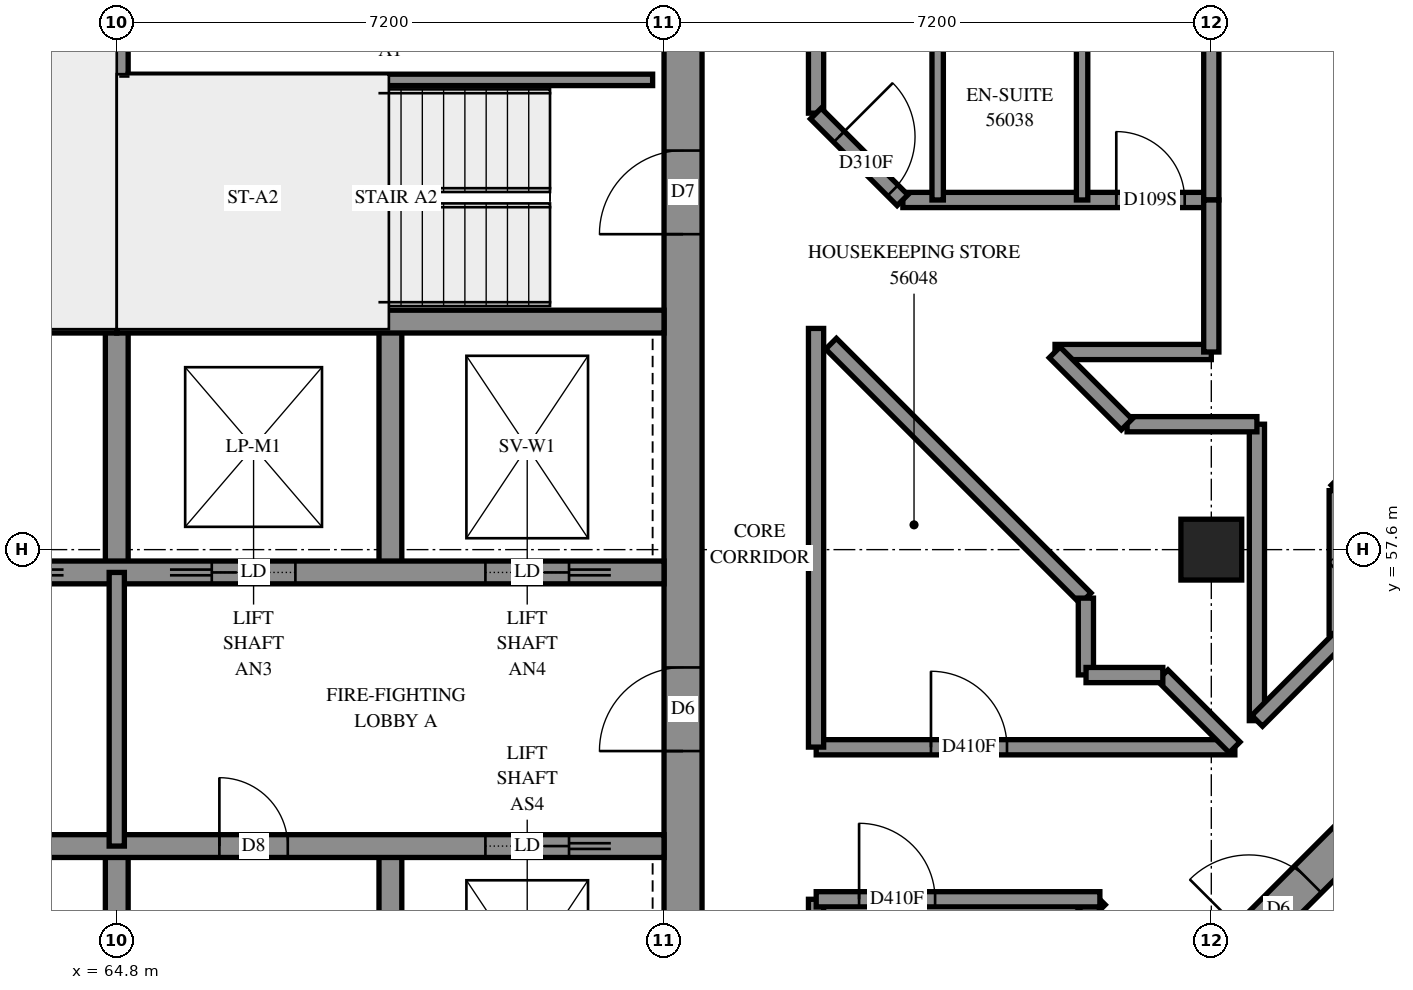
"""IFC4 building model, lengths in metres.
Left out: names, types, materials, properties, quantities, classifications, styles, units other than length and angle.
Written with IfcOpenShell. Run it as: python <this file> out.ifc"""

import sys

from ifc_helpers import new_model, si_unit, direction, frame, frame_2d, origin, origin_2d, place, context, subcontext, project, spatial, rectangle, extrude, element, fill, save


model = new_model("IFC4")
c1 = context("Model", 3, precision=1e-05, world=origin(), true_north=direction((0.0, 1.0)))
c2 = subcontext(c1, "Body", "Model", "MODEL_VIEW")
j1 = project(units=[si_unit("LENGTHUNIT", "METRE"), si_unit("PLANEANGLEUNIT", "RADIAN")], contexts=[c1])
p1 = place(None, origin())
s1 = spatial("IfcSite", under=j1, at=p1, CompositionType="ELEMENT")
p2 = place(p1, origin())
s2 = spatial("IfcBuilding", under=s1, at=p2, CompositionType="ELEMENT")
p3 = place(p2, frame((0.0, 0.0, 206.6)))
s3 = spatial("IfcBuildingStorey", under=s2, at=p3, CompositionType="ELEMENT", Elevation=206.6)
p4 = place(p3, frame((79.2, 57.6, 0.0), z_axis=(0.0, 0.0, 1.0), x_axis=(1.0, 0.0, 0.0)))
e1 = element("IfcColumn", 1, at=p4, inside=s3, PredefinedType="COLUMN", context=c2, shape_type="SweptSolid", body=[
    extrude(rectangle(XDim=0.8, YDim=0.8, at=origin_2d()), origin(), (0.0, 0.0, 1.0), 3.1),
])
p5 = place(p3, frame((72.25, 50.4, -0.3), z_axis=(0.0, 0.0, 1.0), x_axis=(0.0, 1.0, 0.0)))
e2 = element("IfcWall", 2, at=p5, inside=s3, PredefinedType="SHEAR", context=c2, shape_type="SweptSolid", body=[
    extrude(rectangle(XDim=14.4, YDim=0.5, at=frame_2d((7.2, 0.0))), origin(), (0.0, 0.0, 1.0), 2.7),
])
p6 = place(p5, frame((4.55, 0.0, 0.3)))
e3 = element("IfcOpeningElement", 3, at=p6, cuts=e2, PredefinedType="OPENING", context=c2, shape_type="SweptSolid", body=[
    extrude(rectangle(XDim=1.1, YDim=2.1, at=frame_2d((0.55, 1.05))), frame((0.0, 0.26, 0.0), z_axis=(0.0, -1.0, 0.0), x_axis=(1.0, 0.0, 0.0)), (0.0, 0.0, 1.0), 0.52),
])
p7 = place(p5, frame((11.35, 0.0, 0.3)))
e4 = element("IfcOpeningElement", 4, at=p7, cuts=e2, PredefinedType="OPENING", context=c2, shape_type="SweptSolid", body=[
    extrude(rectangle(XDim=1.1, YDim=2.1, at=frame_2d((0.55, 1.05))), frame((0.0, 0.26, 0.0), z_axis=(0.0, -1.0, 0.0), x_axis=(1.0, 0.0, 0.0)), (0.0, 0.0, 1.0), 0.52),
])
for number, where, z_axis, x_axis in (
    (5, (64.8, 50.4, 0.0), (0.0, 0.0, 1.0), (0.0, 1.0, 0.0)),
    (6, (64.8, 57.3, 0.0), (0.0, 0.0, 1.0), (0.0, 1.0, 0.0)),
    (7, (68.4, 50.4, 0.0), (0.0, 0.0, 1.0), (0.0, 1.0, 0.0)),
    (8, (68.4, 57.3, 0.0), (0.0, 0.0, 1.0), (0.0, 1.0, 0.0)),
):
    element("IfcWall", number, at=place(p3, frame(where, z_axis=z_axis, x_axis=x_axis)), inside=s3, PredefinedType="SOLIDWALL", context=c2, shape_type="SweptSolid", body=[
        extrude(rectangle(XDim=3.3, YDim=0.3, at=frame_2d((1.65, 0.0))), origin(), (0.0, 0.0, 1.0), 3.1),
    ])
p8 = place(p3, frame((57.6, 53.7, 0.0), z_axis=(0.0, 0.0, 1.0), x_axis=(1.0, 0.0, 0.0)))
e9 = element("IfcWall", 9, at=p8, inside=s3, PredefinedType="SOLIDWALL", context=c2, shape_type="SweptSolid", body=[
    extrude(rectangle(XDim=14.4, YDim=0.3, at=frame_2d((7.2, 0.0))), origin(), (0.0, 0.0, 1.0), 3.1),
])
p9 = place(p8, frame((1.35, 0.0, 0.0)))
e10 = element("IfcOpeningElement", 10, at=p9, cuts=e9, PredefinedType="OPENING", context=c2, shape_type="SweptSolid", body=[
    extrude(rectangle(XDim=0.9, YDim=2.1, at=frame_2d((0.45, 1.05))), frame((0.0, 0.16, 0.0), z_axis=(0.0, -1.0, 0.0), x_axis=(1.0, 0.0, 0.0)), (0.0, 0.0, 1.0), 0.32),
])
p10 = place(p8, frame((4.95, 0.0, 0.0)))
e11 = element("IfcOpeningElement", 11, at=p10, cuts=e9, PredefinedType="OPENING", context=c2, shape_type="SweptSolid", body=[
    extrude(rectangle(XDim=0.9, YDim=2.1, at=frame_2d((0.45, 1.05))), frame((0.0, 0.16, 0.0), z_axis=(0.0, -1.0, 0.0), x_axis=(1.0, 0.0, 0.0)), (0.0, 0.0, 1.0), 0.32),
])
p11 = place(p8, frame((8.55, 0.0, 0.0)))
e12 = element("IfcOpeningElement", 12, at=p11, cuts=e9, PredefinedType="OPENING", context=c2, shape_type="SweptSolid", body=[
    extrude(rectangle(XDim=0.9, YDim=2.1, at=frame_2d((0.45, 1.05))), frame((0.0, 0.16, 0.0), z_axis=(0.0, -1.0, 0.0), x_axis=(1.0, 0.0, 0.0)), (0.0, 0.0, 1.0), 0.32),
])
p12 = place(p8, frame((12.05, 0.0, 0.0)))
e13 = element("IfcOpeningElement", 13, at=p12, cuts=e9, PredefinedType="OPENING", context=c2, shape_type="SweptSolid", body=[
    extrude(rectangle(XDim=1.1, YDim=2.1, at=frame_2d((0.55, 1.05))), frame((0.0, 0.16, 0.0), z_axis=(0.0, -1.0, 0.0), x_axis=(1.0, 0.0, 0.0)), (0.0, 0.0, 1.0), 0.32),
])
p13 = place(p3, frame((57.6, 57.3, 0.0), z_axis=(0.0, 0.0, 1.0), x_axis=(1.0, 0.0, 0.0)))
e14 = element("IfcWall", 14, at=p13, inside=s3, PredefinedType="SOLIDWALL", context=c2, shape_type="SweptSolid", body=[
    extrude(rectangle(XDim=14.4, YDim=0.3, at=frame_2d((7.2, 0.0))), origin(), (0.0, 0.0, 1.0), 3.1),
])
p14 = place(p13, frame((1.25, 0.0, 0.0)))
e15 = element("IfcOpeningElement", 15, at=p14, cuts=e14, PredefinedType="OPENING", context=c2, shape_type="SweptSolid", body=[
    extrude(rectangle(XDim=1.1, YDim=2.1, at=frame_2d((0.55, 1.05))), frame((0.0, 0.16, 0.0), z_axis=(0.0, -1.0, 0.0), x_axis=(1.0, 0.0, 0.0)), (0.0, 0.0, 1.0), 0.32),
])
p15 = place(p13, frame((4.85, 0.0, 0.0)))
e16 = element("IfcOpeningElement", 16, at=p15, cuts=e14, PredefinedType="OPENING", context=c2, shape_type="SweptSolid", body=[
    extrude(rectangle(XDim=1.1, YDim=2.1, at=frame_2d((0.55, 1.05))), frame((0.0, 0.16, 0.0), z_axis=(0.0, -1.0, 0.0), x_axis=(1.0, 0.0, 0.0)), (0.0, 0.0, 1.0), 0.32),
])
p16 = place(p13, frame((8.45, 0.0, 0.0)))
e17 = element("IfcOpeningElement", 17, at=p16, cuts=e14, PredefinedType="OPENING", context=c2, shape_type="SweptSolid", body=[
    extrude(rectangle(XDim=1.1, YDim=2.1, at=frame_2d((0.55, 1.05))), frame((0.0, 0.16, 0.0), z_axis=(0.0, -1.0, 0.0), x_axis=(1.0, 0.0, 0.0)), (0.0, 0.0, 1.0), 0.32),
])
p17 = place(p13, frame((12.05, 0.0, 0.0)))
e18 = element("IfcOpeningElement", 18, at=p17, cuts=e14, PredefinedType="OPENING", context=c2, shape_type="SweptSolid", body=[
    extrude(rectangle(XDim=1.1, YDim=2.1, at=frame_2d((0.55, 1.05))), frame((0.0, 0.16, 0.0), z_axis=(0.0, -1.0, 0.0), x_axis=(1.0, 0.0, 0.0)), (0.0, 0.0, 1.0), 0.32),
])
for number, where, z_axis, x_axis in (
    (19, (57.6, 60.6, 0.0), (0.0, 0.0, 1.0), (1.0, 0.0, 0.0)),
    (20, (64.8, 60.6, 0.0), (0.0, 0.0, 1.0), (1.0, 0.0, 0.0)),
):
    element("IfcWall", number, at=place(p3, frame(where, z_axis=z_axis, x_axis=x_axis)), inside=s3, PredefinedType="SOLIDWALL", context=c2, shape_type="SweptSolid", body=[
        extrude(rectangle(XDim=7.2, YDim=0.3, at=frame_2d((3.6, 0.0))), origin(), (0.0, 0.0, 1.0), 3.1),
    ])
p18 = place(p3, frame((64.8, 60.6, 0.0), z_axis=(0.0, 0.0, 1.0), x_axis=(0.0, 1.0, 0.0)))
e21 = element("IfcWall", 21, at=p18, inside=s3, PredefinedType="SOLIDWALL", context=c2, shape_type="SweptSolid", body=[
    extrude(rectangle(XDim=4.2, YDim=0.3, at=frame_2d((2.1, 0.0))), origin(), (0.0, 0.0, 1.0), 3.1),
])
p19 = place(p3, frame((76.478, 49.267, -0.3), z_axis=(0.0, 0.0, 1.0), x_axis=(0.7071067812, 0.7071067812, 0.0)))
e22 = element("IfcWall", 22, at=p19, inside=s3, PredefinedType="SHEAR", context=c2, shape_type="SweptSolid", body=[
    extrude(rectangle(XDim=14.4, YDim=0.5, at=frame_2d((7.2, 0.0))), origin(), (0.0, 0.0, 1.0), 2.7),
])
p20 = place(p19, frame((4.55, 0.0, 0.3)))
e23 = element("IfcOpeningElement", 23, at=p20, cuts=e22, PredefinedType="OPENING", context=c2, shape_type="SweptSolid", body=[
    extrude(rectangle(XDim=1.1, YDim=2.1, at=frame_2d((0.55, 1.05))), frame((0.0, 0.26, 0.0), z_axis=(0.0, -1.0, 0.0), x_axis=(1.0, 0.0, 0.0)), (0.0, 0.0, 1.0), 0.52),
])
p21 = place(p19, frame((11.35, 0.0, 0.3)))
e24 = element("IfcOpeningElement", 24, at=p21, cuts=e22, PredefinedType="OPENING", context=c2, shape_type="SweptSolid", body=[
    extrude(rectangle(XDim=1.1, YDim=2.1, at=frame_2d((0.55, 1.05))), frame((0.0, 0.26, 0.0), z_axis=(0.0, -1.0, 0.0), x_axis=(1.0, 0.0, 0.0)), (0.0, 0.0, 1.0), 0.52),
])
p22 = place(p3, frame((64.95, 63.78, 0.0), z_axis=(0.0, 0.0, 1.0), x_axis=(1.0, 0.0, 0.0)))
e25 = element("IfcWall", 25, at=p22, inside=s3, PredefinedType="PARTITIONING", context=c2, shape_type="SweptSolid", body=[
    extrude(rectangle(XDim=6.9, YDim=0.15, at=frame_2d((3.45, 0.0))), origin(), (0.0, 0.0, 1.0), 3.1),
])
p23 = place(p3, frame((64.8, 53.7, 0.0), z_axis=(0.0, 0.0, 1.0), x_axis=(0.0, 1.0, 0.0)))
e26 = element("IfcWall", 26, at=p23, inside=s3, PredefinedType="PARTITIONING", context=c2, shape_type="SweptSolid", body=[
    extrude(rectangle(XDim=3.6, YDim=0.2, at=frame_2d((1.8, 0.0))), origin(), (0.0, 0.0, 1.0), 3.1),
])
p24 = place(p3, frame((80.849, 58.377, 0.0), z_axis=(0.0, 0.0, 1.0), x_axis=(0.7071121022, 0.7071014601, 0.0)))
e27 = element("IfcWall", 27, at=p24, inside=s3, PredefinedType="PARTITIONING", context=c2, shape_type="SweptSolid", body=[
    extrude(rectangle(XDim=9.397, YDim=0.2, at=frame_2d((4.698, 0.0))), origin(), (0.0, 0.0, 1.0), 3.1),
])
p25 = place(p3, frame((74.002, 55.0, 0.0), z_axis=(0.0, 0.0, 1.0), x_axis=(1.0, 0.0, 0.0)))
e28 = element("IfcWall", 28, at=p25, inside=s3, PredefinedType="PARTITIONING", context=c2, shape_type="SweptSolid", body=[
    extrude(rectangle(XDim=5.508, YDim=0.2, at=frame_2d((2.754, 0.0))), origin(), (0.0, 0.0, 1.0), 3.1),
])
p26 = place(p25, frame((1.51, 0.0, 0.0)))
e29 = element("IfcOpeningElement", 29, at=p26, cuts=e28, PredefinedType="OPENING", context=c2, shape_type="SweptSolid", body=[
    extrude(rectangle(XDim=1.0, YDim=2.1, at=frame_2d((0.5, 1.05))), frame((0.0, 0.11, 0.0), z_axis=(0.0, -1.0, 0.0), x_axis=(1.0, 0.0, 0.0)), (0.0, 0.0, 1.0), 0.22),
])
p27 = place(p3, frame((74.0, 55.002, 0.0), z_axis=(0.0, 0.0, 1.0), x_axis=(0.0, 1.0, 0.0)))
e30 = element("IfcWall", 30, at=p27, inside=s3, PredefinedType="PARTITIONING", context=c2, shape_type="SweptSolid", body=[
    extrude(rectangle(XDim=5.508, YDim=0.2, at=frame_2d((2.754, 0.0))), origin(), (0.0, 0.0, 1.0), 3.1),
])
p28 = place(p3, frame((74.001, 49.267, 0.0), z_axis=(0.0, 0.0, 1.0), x_axis=(0.7071067812, 0.7071067812, 0.0)))
e31 = element("IfcWall", 31, at=p28, inside=s3, PredefinedType="PARTITIONING", context=c2, shape_type="SweptSolid", body=[
    extrude(rectangle(XDim=5.278, YDim=0.2, at=frame_2d((2.639, 0.0))), origin(), (0.0, 0.0, 1.0), 3.1),
])
p29 = place(p3, frame((74.197, 60.309, 0.0), z_axis=(0.0, 0.0, 1.0), x_axis=(0.7071067812, -0.7071067812, 0.0)))
e32 = element("IfcWall", 32, at=p29, inside=s3, PredefinedType="PARTITIONING", context=c2, shape_type="SweptSolid", body=[
    extrude(rectangle(XDim=4.738, YDim=0.2, at=frame_2d((2.369, 0.0))), origin(), (0.0, 0.0, 1.0), 3.1),
])
p30 = place(p3, frame((75.142, 62.2, 0.0), z_axis=(0.0, 0.0, 1.0), x_axis=(1.0, 0.0, 0.0)))
e33 = element("IfcWall", 33, at=p30, inside=s3, PredefinedType="PARTITIONING", context=c2, shape_type="SweptSolid", body=[
    extrude(rectangle(XDim=4.058, YDim=0.2, at=frame_2d((2.029, 0.0))), origin(), (0.0, 0.0, 1.0), 3.1),
])
p31 = place(p30, frame((2.808, 0.0, 0.0)))
e34 = element("IfcOpeningElement", 34, at=p31, cuts=e33, PredefinedType="OPENING", context=c2, shape_type="SweptSolid", body=[
    extrude(rectangle(XDim=0.9, YDim=2.1, at=frame_2d((0.45, 1.05))), frame((0.0, 0.11, 0.0), z_axis=(0.0, -1.0, 0.0), x_axis=(1.0, 0.0, 0.0)), (0.0, 0.0, 1.0), 0.22),
])
p32 = place(p3, frame((79.8, 55.35, 0.0), z_axis=(0.0, 0.0, 1.0), x_axis=(0.0, 1.0, 0.0)))
e35 = element("IfcWall", 35, at=p32, inside=s3, PredefinedType="PARTITIONING", context=c2, shape_type="SweptSolid", body=[
    extrude(rectangle(XDim=3.9, YDim=0.2, at=frame_2d((1.95, 0.0))), origin(), (0.0, 0.0, 1.0), 3.1),
])
p33 = place(p3, frame((74.0, 49.266, 0.0), z_axis=(0.0, 0.0, 1.0), x_axis=(0.0, 1.0, 0.0)))
e36 = element("IfcWall", 36, at=p33, inside=s3, PredefinedType="PARTITIONING", context=c2, shape_type="SweptSolid", body=[
    extrude(rectangle(XDim=3.734, YDim=0.2, at=frame_2d((1.867, 0.0))), origin(), (0.0, 0.0, 1.0), 3.1),
])
p34 = place(p3, frame((74.002, 53.0, 0.0), z_axis=(0.0, 0.0, 1.0), x_axis=(1.0, 0.0, 0.0)))
e37 = element("IfcWall", 37, at=p34, inside=s3, PredefinedType="PARTITIONING", context=c2, shape_type="SweptSolid", body=[
    extrude(rectangle(XDim=3.732, YDim=0.2, at=frame_2d((1.866, 0.0))), origin(), (0.0, 0.0, 1.0), 3.1),
])
p35 = place(p34, frame((0.564, 0.0, 0.0)))
e38 = element("IfcOpeningElement", 38, at=p35, cuts=e37, PredefinedType="OPENING", context=c2, shape_type="SweptSolid", body=[
    extrude(rectangle(XDim=1.0, YDim=2.1, at=frame_2d((0.5, 1.05))), frame((0.0, 0.11, 0.0), z_axis=(0.0, -1.0, 0.0), x_axis=(1.0, 0.0, 0.0)), (0.0, 0.0, 1.0), 0.22),
])
p36 = place(p3, frame((74.0, 63.342, 0.0), z_axis=(0.0, 0.0, 1.0), x_axis=(0.0, 1.0, 0.0)))
e39 = element("IfcWall", 39, at=p36, inside=s3, PredefinedType="PARTITIONING", context=c2, shape_type="SweptSolid", body=[
    extrude(rectangle(XDim=3.458, YDim=0.2, at=frame_2d((1.729, 0.0))), origin(), (0.0, 0.0, 1.0), 3.1),
])
for number, where, z_axis, x_axis in (
    (40, (75.6, 62.2, 0.0), (0.0, 0.0, 1.0), (0.0, 1.0, 0.0)),
    (41, (77.5, 62.2, 0.0), (0.0, 0.0, 1.0), (0.0, 1.0, 0.0)),
):
    element("IfcWall", number, at=place(p3, frame(where, z_axis=z_axis, x_axis=x_axis)), inside=s3, PredefinedType="PARTITIONING", context=c2, shape_type="SweptSolid", body=[
        extrude(rectangle(XDim=2.4, YDim=0.15, at=frame_2d((1.2, 0.0))), origin(), (0.0, 0.0, 1.0), 3.1),
    ])
p37 = place(p3, frame((79.2, 62.2, 0.0), z_axis=(0.0, 0.0, 1.0), x_axis=(0.0, 1.0, 0.0)))
e42 = element("IfcWall", 42, at=p37, inside=s3, PredefinedType="PARTITIONING", context=c2, shape_type="SweptSolid", body=[
    extrude(rectangle(XDim=2.2, YDim=0.2, at=frame_2d((1.1, 0.0))), origin(), (0.0, 0.0, 1.0), 3.1),
])
p38 = place(p3, frame((77.144, 60.2, 0.0), z_axis=(0.0, 0.0, 1.0), x_axis=(1.0, 0.0, 0.0)))
e43 = element("IfcWall", 43, at=p38, inside=s3, PredefinedType="PARTITIONING", context=c2, shape_type="SweptSolid", body=[
    extrude(rectangle(XDim=2.056, YDim=0.2, at=frame_2d((1.028, 0.0))), origin(), (0.0, 0.0, 1.0), 3.1),
])
p39 = place(p3, frame((79.2, 60.2, 0.0), z_axis=(0.0, 0.0, 1.0), x_axis=(0.0, 1.0, 0.0)))
e44 = element("IfcWall", 44, at=p39, inside=s3, PredefinedType="PARTITIONING", context=c2, shape_type="SweptSolid", body=[
    extrude(rectangle(XDim=2.0, YDim=0.2, at=frame_2d((1.0, 0.0))), origin(), (0.0, 0.0, 1.0), 3.1),
])
p40 = place(p3, frame((80.85, 56.49, 0.0), z_axis=(0.0, 0.0, 1.0), x_axis=(0.0, 1.0, 0.0)))
e45 = element("IfcWall", 45, at=p40, inside=s3, PredefinedType="PARTITIONING", context=c2, shape_type="SweptSolid", body=[
    extrude(rectangle(XDim=1.886, YDim=0.2, at=frame_2d((0.943, 0.0))), origin(), (0.0, 0.0, 1.0), 3.1),
])
p41 = place(p3, frame((78.092, 59.25, 0.0), z_axis=(0.0, 0.0, 1.0), x_axis=(1.0, 0.0, 0.0)))
e46 = element("IfcWall", 46, at=p41, inside=s3, PredefinedType="PARTITIONING", context=c2, shape_type="SweptSolid", body=[
    extrude(rectangle(XDim=1.708, YDim=0.2, at=frame_2d((0.854, 0.0))), origin(), (0.0, 0.0, 1.0), 3.1),
])
p42 = place(p3, frame((73.997, 63.337, 0.0), z_axis=(0.0, 0.0, 1.0), x_axis=(0.7071067812, -0.7071067812, 0.0)))
e47 = element("IfcWall", 47, at=p42, inside=s3, PredefinedType="PARTITIONING", context=c2, shape_type="SweptSolid", body=[
    extrude(rectangle(XDim=1.612, YDim=0.2, at=frame_2d((0.806, 0.0))), origin(), (0.0, 0.0, 1.0), 3.1),
])
p43 = place(p42, frame((0.432, 0.0, 0.0)))
e48 = element("IfcOpeningElement", 48, at=p43, cuts=e47, PredefinedType="OPENING", context=c2, shape_type="SweptSolid", body=[
    extrude(rectangle(XDim=1.0, YDim=2.1, at=frame_2d((0.5, 1.05))), frame((0.0, 0.11, 0.0), z_axis=(0.0, -1.0, 0.0), x_axis=(1.0, 0.0, 0.0)), (0.0, 0.0, 1.0), 0.22),
])
p44 = place(p3, frame((79.803, 55.347, 0.0), z_axis=(0.0, 0.0, 1.0), x_axis=(0.706460727, 0.7077522457, 0.0)))
e49 = element("IfcWall", 49, at=p44, inside=s3, PredefinedType="PARTITIONING", context=c2, shape_type="SweptSolid", body=[
    extrude(rectangle(XDim=1.549, YDim=0.2, at=frame_2d((0.774, 0.0))), origin(), (0.0, 0.0, 1.0), 3.1),
])
for number, where, z_axis, x_axis in (
    (50, (78.559, 55.947, 0.0), (0.0, 0.0, 1.0), (0.707, -0.707, 0.0)),
    (51, (77.139, 60.195, 0.0), (0.0, 0.0, 1.0), (0.707, -0.707, 0.0)),
):
    element("IfcWall", number, at=place(p3, frame(where, z_axis=z_axis, x_axis=x_axis)), inside=s3, PredefinedType="PARTITIONING", context=c2, shape_type="SweptSolid", body=[
        extrude(rectangle(XDim=1.341, YDim=0.2, at=frame_2d((0.67, 0.0))), origin(), (0.0, 0.0, 1.0), 3.1),
    ])
for number, where, z_axis, x_axis in (
    (52, (77.55, 55.952, 0.0), (0.0, 0.0, 1.0), (0.0, 1.0, 0.0)),
    (53, (77.552, 55.95, 0.0), (0.0, 0.0, 1.0), (1.0, 0.0, 0.0)),
):
    element("IfcWall", number, at=place(p3, frame(where, z_axis=z_axis, x_axis=x_axis)), inside=s3, PredefinedType="PARTITIONING", context=c2, shape_type="SweptSolid", body=[
        extrude(rectangle(XDim=1.01, YDim=0.2, at=frame_2d((0.505, 0.0))), origin(), (0.0, 0.0, 1.0), 3.1),
    ])
p45 = place(p6, origin())
e54 = element("IfcDoor", 54, at=p45, inside=s3, OperationType="DOUBLE_DOOR_SINGLE_SWING", PredefinedType="DOOR", context=c2, shape_type="SweptSolid", body=[
    extrude(rectangle(XDim=1.1, YDim=2.1, at=frame_2d((0.55, 1.05))), frame((0.0, 0.025, 0.0), z_axis=(0.0, -1.0, 0.0), x_axis=(1.0, 0.0, 0.0)), (0.0, 0.0, 1.0), 0.05),
])
fill(e3, e54)
p46 = place(p7, origin())
e55 = element("IfcDoor", 55, at=p46, inside=s3, OperationType="SINGLE_SWING_RIGHT", PredefinedType="DOOR", context=c2, shape_type="SweptSolid", body=[
    extrude(rectangle(XDim=1.1, YDim=2.1, at=frame_2d((0.55, 1.05))), frame((0.0, 0.025, 0.0), z_axis=(0.0, -1.0, 0.0), x_axis=(1.0, 0.0, 0.0)), (0.0, 0.0, 1.0), 0.05),
])
fill(e4, e55)
p47 = place(p11, origin())
e56 = element("IfcDoor", 56, at=p47, inside=s3, OperationType="SINGLE_SWING_LEFT", PredefinedType="DOOR", context=c2, shape_type="SweptSolid", body=[
    extrude(rectangle(XDim=0.9, YDim=2.1, at=frame_2d((0.45, 1.05))), frame((0.0, 0.025, 0.0), z_axis=(0.0, -1.0, 0.0), x_axis=(1.0, 0.0, 0.0)), (0.0, 0.0, 1.0), 0.05),
])
fill(e12, e56)
p48 = place(p12, origin())
e57 = element("IfcDoor", 57, at=p48, inside=s3, OperationType="SLIDING_TO_RIGHT", PredefinedType="DOOR", context=c2, shape_type="SweptSolid", body=[
    extrude(rectangle(XDim=1.1, YDim=2.1, at=frame_2d((0.55, 1.05))), frame((0.0, 0.025, 0.0), z_axis=(0.0, -1.0, 0.0), x_axis=(1.0, 0.0, 0.0)), (0.0, 0.0, 1.0), 0.05),
])
fill(e13, e57)
p49 = place(p16, origin())
e58 = element("IfcDoor", 58, at=p49, inside=s3, OperationType="SLIDING_TO_LEFT", PredefinedType="DOOR", context=c2, shape_type="SweptSolid", body=[
    extrude(rectangle(XDim=1.1, YDim=2.1, at=frame_2d((0.55, 1.05))), frame((0.0, 0.025, 0.0), z_axis=(0.0, -1.0, 0.0), x_axis=(1.0, 0.0, 0.0)), (0.0, 0.0, 1.0), 0.05),
])
fill(e17, e58)
p50 = place(p17, origin())
e59 = element("IfcDoor", 59, at=p50, inside=s3, OperationType="SLIDING_TO_RIGHT", PredefinedType="DOOR", context=c2, shape_type="SweptSolid", body=[
    extrude(rectangle(XDim=1.1, YDim=2.1, at=frame_2d((0.55, 1.05))), frame((0.0, 0.025, 0.0), z_axis=(0.0, -1.0, 0.0), x_axis=(1.0, 0.0, 0.0)), (0.0, 0.0, 1.0), 0.05),
])
fill(e18, e59)
p51 = place(p20, origin())
e60 = element("IfcDoor", 60, at=p51, inside=s3, OperationType="DOUBLE_DOOR_SINGLE_SWING", PredefinedType="DOOR", context=c2, shape_type="SweptSolid", body=[
    extrude(rectangle(XDim=1.1, YDim=2.1, at=frame_2d((0.55, 1.05))), frame((0.0, 0.025, 0.0), z_axis=(0.0, -1.0, 0.0), x_axis=(1.0, 0.0, 0.0)), (0.0, 0.0, 1.0), 0.05),
])
fill(e23, e60)
p52 = place(p35, origin())
e61 = element("IfcDoor", 61, at=p52, inside=s3, OperationType="SINGLE_SWING_RIGHT", PredefinedType="DOOR", context=c2, shape_type="SweptSolid", body=[
    extrude(rectangle(XDim=1.0, YDim=2.1, at=frame_2d((0.5, 1.05))), frame((0.0, 0.025, 0.0), z_axis=(0.0, -1.0, 0.0), x_axis=(1.0, 0.0, 0.0)), (0.0, 0.0, 1.0), 0.05),
])
fill(e38, e61)
p53 = place(p43, origin())
e62 = element("IfcDoor", 62, at=p53, inside=s3, OperationType="SINGLE_SWING_RIGHT", PredefinedType="DOOR", context=c2, shape_type="SweptSolid", body=[
    extrude(rectangle(XDim=1.0, YDim=2.1, at=frame_2d((0.5, 1.05))), frame((0.0, 0.025, 0.0), z_axis=(0.0, -1.0, 0.0), x_axis=(1.0, 0.0, 0.0)), (0.0, 0.0, 1.0), 0.05),
])
fill(e48, e62)
p54 = place(p31, origin())
e63 = element("IfcDoor", 63, at=p54, inside=s3, OperationType="SINGLE_SWING_LEFT", PredefinedType="DOOR", context=c2, shape_type="SweptSolid", body=[
    extrude(rectangle(XDim=0.9, YDim=2.1, at=frame_2d((0.45, 1.05))), frame((0.0, 0.025, 0.0), z_axis=(0.0, -1.0, 0.0), x_axis=(1.0, 0.0, 0.0)), (0.0, 0.0, 1.0), 0.05),
])
fill(e34, e63)
p55 = place(p26, origin())
e64 = element("IfcDoor", 64, at=p55, inside=s3, OperationType="SINGLE_SWING_LEFT", PredefinedType="DOOR", context=c2, shape_type="SweptSolid", body=[
    extrude(rectangle(XDim=1.0, YDim=2.1, at=frame_2d((0.5, 1.05))), frame((0.0, 0.025, 0.0), z_axis=(0.0, -1.0, 0.0), x_axis=(1.0, 0.0, 0.0)), (0.0, 0.0, 1.0), 0.05),
])
fill(e29, e64)
save(model, sys.argv[1])
